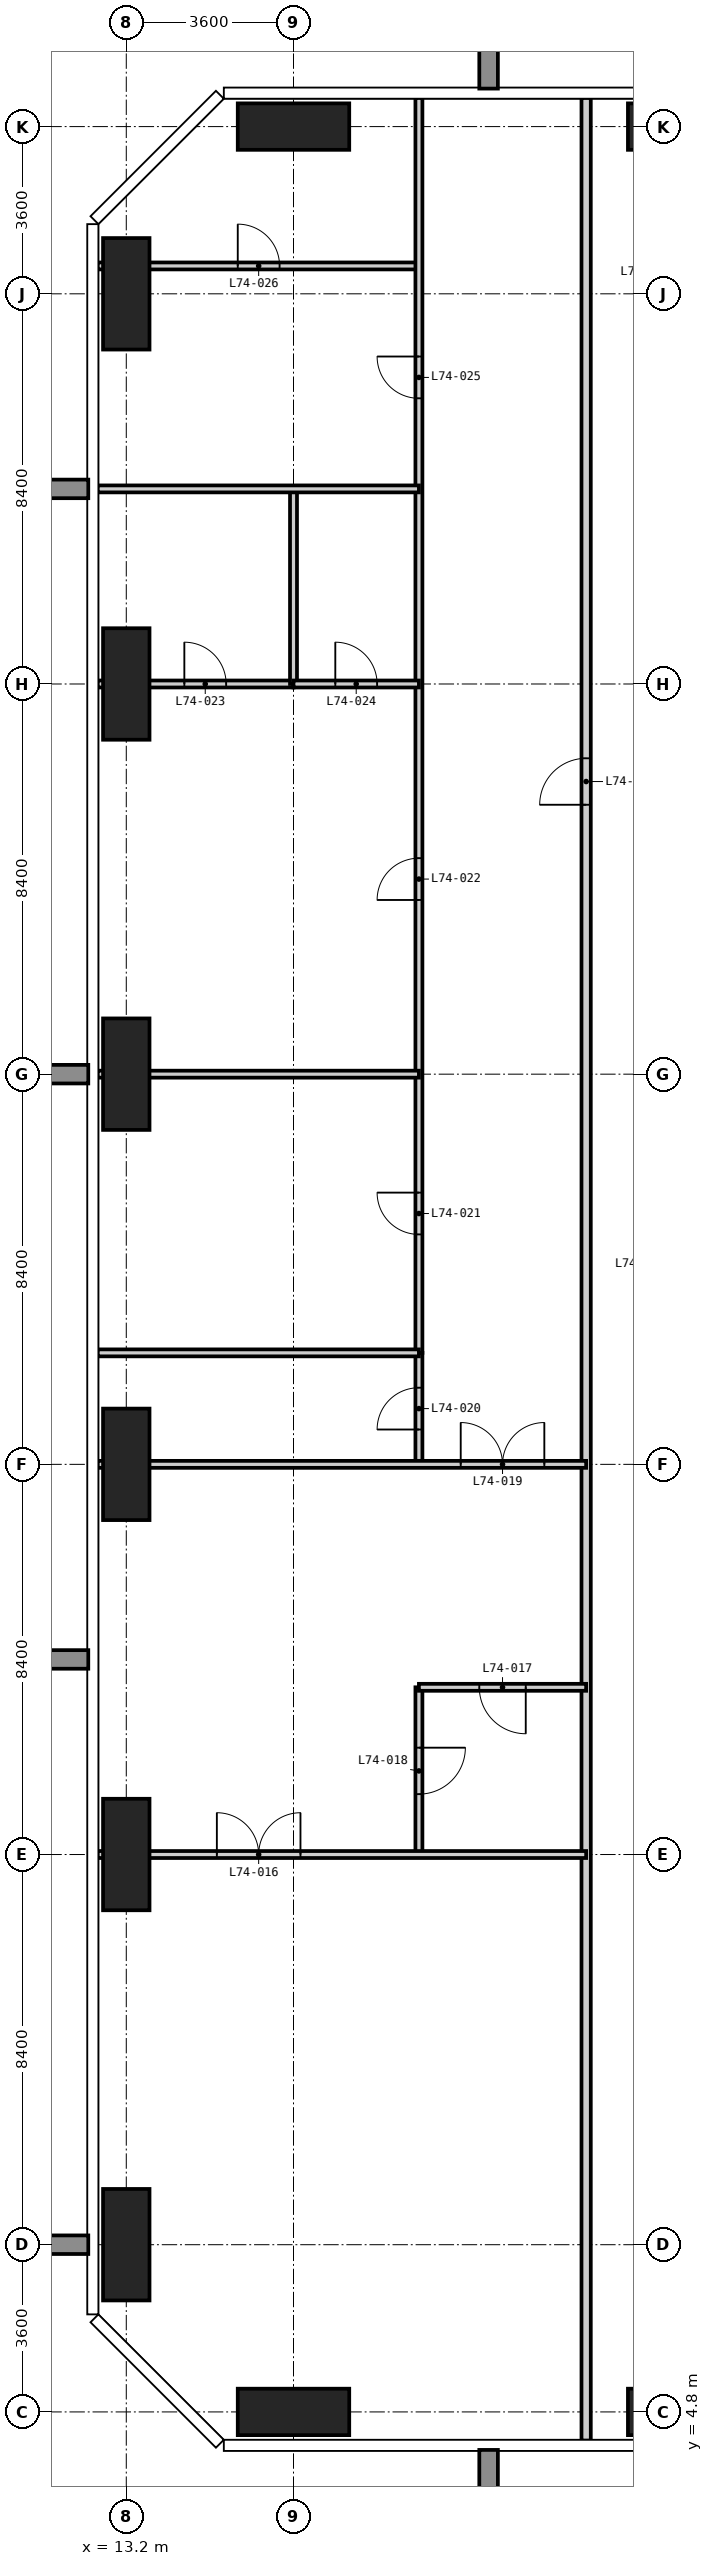
"""IFC4 building model, lengths in metres.
Left out: names, types, materials, properties, quantities, classifications, styles, units other than length and angle.
Written with IfcOpenShell. Run it as: python <this file> out.ifc"""

import sys

from ifc_helpers import new_model, si_unit, direction, frame, frame_2d, origin, origin_2d, place, context, subcontext, project, spatial, rectangle, extrude, element, fill, save


model = new_model("IFC4")
c1 = context("Model", 3, precision=1e-05, world=origin(), true_north=direction((0.0, 1.0)))
c2 = subcontext(c1, "Body", "Model", "MODEL_VIEW")
j1 = project(units=[si_unit("LENGTHUNIT", "METRE"), si_unit("PLANEANGLEUNIT", "RADIAN")], contexts=[c1])
p1 = place(None, origin())
s1 = spatial("IfcSite", under=j1, at=p1, CompositionType="ELEMENT")
p2 = place(p1, origin())
s2 = spatial("IfcBuilding", under=s1, at=p2, CompositionType="ELEMENT")
p3 = place(p2, frame((0.0, 0.0, 289.1)))
s3 = spatial("IfcBuildingStorey", under=s2, at=p3, CompositionType="ELEMENT", Elevation=289.1)
for number, where, z_axis, x_axis in (
    (1, (13.2, 8.4, -0.35), (0.0, 0.0, 1.0), (1.0, 0.0, 0.0)),
    (2, (13.2, 16.8, -0.35), (0.0, 0.0, 1.0), (1.0, 0.0, 0.0)),
    (3, (13.2, 25.2, -0.35), (0.0, 0.0, 1.0), (1.0, 0.0, 0.0)),
    (4, (13.2, 33.6, -0.35), (0.0, 0.0, 1.0), (1.0, 0.0, 0.0)),
    (5, (13.2, 42.0, -0.35), (0.0, 0.0, 1.0), (1.0, 0.0, 0.0)),
    (6, (13.2, 50.4, -0.35), (0.0, 0.0, 1.0), (1.0, 0.0, 0.0)),
):
    element("IfcColumn", number, at=place(p3, frame(where, z_axis=z_axis, x_axis=x_axis)), inside=s3, PredefinedType="COLUMN", context=c2, shape_type="SweptSolid", body=[
        extrude(rectangle(XDim=1.0, YDim=2.4, at=origin_2d()), origin(), (0.0, 0.0, 1.0), 4.5),
    ])
for number, where, z_axis, x_axis in (
    (7, (16.8, 4.8, -0.35), (0.0, 0.0, 1.0), (1.0, 0.0, 0.0)),
    (8, (16.8, 54.0, -0.35), (0.0, 0.0, 1.0), (1.0, 0.0, 0.0)),
    (9, (25.2, 4.8, -0.35), (0.0, 0.0, 1.0), (1.0, 0.0, 0.0)),
    (10, (25.2, 54.0, -0.35), (0.0, 0.0, 1.0), (1.0, 0.0, 0.0)),
):
    element("IfcColumn", number, at=place(p3, frame(where, z_axis=z_axis, x_axis=x_axis)), inside=s3, PredefinedType="COLUMN", context=c2, shape_type="SweptSolid", body=[
        extrude(rectangle(XDim=2.4, YDim=1.0, at=origin_2d()), origin(), (0.0, 0.0, 1.0), 4.5),
    ])
p4 = place(p3, frame((19.5, 25.2, 0.0), z_axis=(0.0, 0.0, 1.0), x_axis=(0.0, 1.0, 0.0)))
e11 = element("IfcWall", 11, at=p4, inside=s3, PredefinedType="PARTITIONING", context=c2, shape_type="SweptSolid", body=[
    extrude(rectangle(XDim=2.4, YDim=0.15, at=frame_2d((1.2, 0.0))), origin(), (0.0, 0.0, 1.0), 4.15),
])
p5 = place(p4, frame((0.75, 0.0, 0.0)))
e12 = element("IfcOpeningElement", 12, at=p5, cuts=e11, PredefinedType="OPENING", context=c2, shape_type="SweptSolid", body=[
    extrude(rectangle(XDim=0.9, YDim=2.1, at=frame_2d((0.45, 1.05))), frame((0.0, 0.085, 0.0), z_axis=(0.0, -1.0, 0.0), x_axis=(1.0, 0.0, 0.0)), (0.0, 0.0, 1.0), 0.17),
])
p6 = place(p3, frame((12.582, 42.0, 0.0), z_axis=(0.0, 0.0, 1.0), x_axis=(1.0, 0.0, 0.0)))
e13 = element("IfcWall", 13, at=p6, inside=s3, PredefinedType="PARTITIONING", context=c2, shape_type="SweptSolid", body=[
    extrude(rectangle(XDim=4.218, YDim=0.15, at=frame_2d((2.109, 0.0))), origin(), (0.0, 0.0, 1.0), 4.15),
])
p7 = place(p6, frame((1.868, 0.0, 0.0)))
e14 = element("IfcOpeningElement", 14, at=p7, cuts=e13, PredefinedType="OPENING", context=c2, shape_type="SweptSolid", body=[
    extrude(rectangle(XDim=0.9, YDim=2.1, at=frame_2d((0.45, 1.05))), frame((0.0, 0.085, 0.0), z_axis=(0.0, -1.0, 0.0), x_axis=(1.0, 0.0, 0.0)), (0.0, 0.0, 1.0), 0.17),
])
p8 = place(p3, frame((12.582, 51.0, 0.0), z_axis=(0.0, 0.0, 1.0), x_axis=(1.0, 0.0, 0.0)))
e15 = element("IfcWall", 15, at=p8, inside=s3, PredefinedType="PARTITIONING", context=c2, shape_type="SweptSolid", body=[
    extrude(rectangle(XDim=6.918, YDim=0.15, at=frame_2d((3.459, 0.0))), origin(), (0.0, 0.0, 1.0), 4.15),
])
p9 = place(p8, frame((3.018, 0.0, 0.0)))
e16 = element("IfcOpeningElement", 16, at=p9, cuts=e15, PredefinedType="OPENING", context=c2, shape_type="SweptSolid", body=[
    extrude(rectangle(XDim=0.9, YDim=2.1, at=frame_2d((0.45, 1.05))), frame((0.0, 0.085, 0.0), z_axis=(0.0, -1.0, 0.0), x_axis=(1.0, 0.0, 0.0)), (0.0, 0.0, 1.0), 0.17),
])
p10 = place(p3, frame((23.1, 4.182, 0.0), z_axis=(0.0, 0.0, 1.0), x_axis=(0.0, 1.0, 0.0)))
e17 = element("IfcWall", 17, at=p10, inside=s3, PredefinedType="PARTITIONING", context=c2, shape_type="SweptSolid", body=[
    extrude(rectangle(XDim=50.436, YDim=0.2, at=frame_2d((25.218, 0.0))), origin(), (0.0, 0.0, 1.0), 4.15),
])
p11 = place(p10, frame((35.218, 0.0, 0.0)))
e18 = element("IfcOpeningElement", 18, at=p11, cuts=e17, PredefinedType="OPENING", context=c2, shape_type="SweptSolid", body=[
    extrude(rectangle(XDim=1.0, YDim=2.2, at=frame_2d((0.5, 1.1))), frame((0.0, 0.11, 0.0), z_axis=(0.0, -1.0, 0.0), x_axis=(1.0, 0.0, 0.0)), (0.0, 0.0, 1.0), 0.22),
])
p12 = place(p3, frame((16.8, 42.0, 0.0), z_axis=(0.0, 0.0, 1.0), x_axis=(0.0, 1.0, 0.0)))
e19 = element("IfcWall", 19, at=p12, inside=s3, PredefinedType="PARTITIONING", context=c2, shape_type="SweptSolid", body=[
    extrude(rectangle(XDim=4.2, YDim=0.15, at=frame_2d((2.1, 0.0))), origin(), (0.0, 0.0, 1.0), 4.15),
])
p13 = place(p3, frame((19.5, 16.8, 0.0), z_axis=(0.0, 0.0, 1.0), x_axis=(0.0, 1.0, 0.0)))
e20 = element("IfcWall", 20, at=p13, inside=s3, PredefinedType="PARTITIONING", context=c2, shape_type="SweptSolid", body=[
    extrude(rectangle(XDim=3.6, YDim=0.15, at=frame_2d((1.8, 0.0))), origin(), (0.0, 0.0, 1.0), 4.15),
])
p14 = place(p13, frame((1.3, 0.0, 0.0)))
e21 = element("IfcOpeningElement", 21, at=p14, cuts=e20, PredefinedType="OPENING", context=c2, shape_type="SweptSolid", body=[
    extrude(rectangle(XDim=1.0, YDim=2.1, at=frame_2d((0.5, 1.05))), frame((0.0, 0.085, 0.0), z_axis=(0.0, -1.0, 0.0), x_axis=(1.0, 0.0, 0.0)), (0.0, 0.0, 1.0), 0.17),
])
p15 = place(p3, frame((19.5, 27.6, 0.0), z_axis=(0.0, 0.0, 1.0), x_axis=(0.0, 1.0, 0.0)))
e22 = element("IfcWall", 22, at=p15, inside=s3, PredefinedType="PARTITIONING", context=c2, shape_type="SweptSolid", body=[
    extrude(rectangle(XDim=27.018, YDim=0.15, at=frame_2d((13.509, 0.0))), origin(), (0.0, 0.0, 1.0), 4.15),
])
p16 = place(p15, frame((2.55, 0.0, 0.0)))
e23 = element("IfcOpeningElement", 23, at=p16, cuts=e22, PredefinedType="OPENING", context=c2, shape_type="SweptSolid", body=[
    extrude(rectangle(XDim=0.9, YDim=2.1, at=frame_2d((0.45, 1.05))), frame((0.0, 0.085, 0.0), z_axis=(0.0, -1.0, 0.0), x_axis=(1.0, 0.0, 0.0)), (0.0, 0.0, 1.0), 0.17),
])
p17 = place(p15, frame((9.75, 0.0, 0.0)))
e24 = element("IfcOpeningElement", 24, at=p17, cuts=e22, PredefinedType="OPENING", context=c2, shape_type="SweptSolid", body=[
    extrude(rectangle(XDim=0.9, YDim=2.1, at=frame_2d((0.45, 1.05))), frame((0.0, 0.085, 0.0), z_axis=(0.0, -1.0, 0.0), x_axis=(1.0, 0.0, 0.0)), (0.0, 0.0, 1.0), 0.17),
])
p18 = place(p15, frame((20.55, 0.0, 0.0)))
e25 = element("IfcOpeningElement", 25, at=p18, cuts=e22, PredefinedType="OPENING", context=c2, shape_type="SweptSolid", body=[
    extrude(rectangle(XDim=0.9, YDim=2.1, at=frame_2d((0.45, 1.05))), frame((0.0, 0.085, 0.0), z_axis=(0.0, -1.0, 0.0), x_axis=(1.0, 0.0, 0.0)), (0.0, 0.0, 1.0), 0.17),
])
p19 = place(p3, frame((12.582, 16.8, 0.0), z_axis=(0.0, 0.0, 1.0), x_axis=(1.0, 0.0, 0.0)))
e26 = element("IfcWall", 26, at=p19, inside=s3, PredefinedType="PARTITIONING", context=c2, shape_type="SweptSolid", body=[
    extrude(rectangle(XDim=10.518, YDim=0.15, at=frame_2d((5.259, 0.0))), origin(), (0.0, 0.0, 1.0), 4.15),
])
p20 = place(p19, frame((2.568, 0.0, 0.0)))
e27 = element("IfcOpeningElement", 27, at=p20, cuts=e26, PredefinedType="OPENING", context=c2, shape_type="SweptSolid", body=[
    extrude(rectangle(XDim=1.8, YDim=2.4, at=frame_2d((0.9, 1.2))), frame((0.0, 0.085, 0.0), z_axis=(0.0, -1.0, 0.0), x_axis=(1.0, 0.0, 0.0)), (0.0, 0.0, 1.0), 0.17),
])
p21 = place(p3, frame((19.5, 20.4, 0.0), z_axis=(0.0, 0.0, 1.0), x_axis=(1.0, 0.0, 0.0)))
e28 = element("IfcWall", 28, at=p21, inside=s3, PredefinedType="PARTITIONING", context=c2, shape_type="SweptSolid", body=[
    extrude(rectangle(XDim=3.6, YDim=0.15, at=frame_2d((1.8, 0.0))), origin(), (0.0, 0.0, 1.0), 4.15),
])
p22 = place(p21, frame((1.3, 0.0, 0.0)))
e29 = element("IfcOpeningElement", 29, at=p22, cuts=e28, PredefinedType="OPENING", context=c2, shape_type="SweptSolid", body=[
    extrude(rectangle(XDim=1.0, YDim=2.1, at=frame_2d((0.5, 1.05))), frame((0.0, 0.085, 0.0), z_axis=(0.0, -1.0, 0.0), x_axis=(1.0, 0.0, 0.0)), (0.0, 0.0, 1.0), 0.17),
])
p23 = place(p3, frame((12.582, 25.2, 0.0), z_axis=(0.0, 0.0, 1.0), x_axis=(1.0, 0.0, 0.0)))
e30 = element("IfcWall", 30, at=p23, inside=s3, PredefinedType="PARTITIONING", context=c2, shape_type="SweptSolid", body=[
    extrude(rectangle(XDim=10.518, YDim=0.15, at=frame_2d((5.259, 0.0))), origin(), (0.0, 0.0, 1.0), 4.15),
])
p24 = place(p23, frame((7.818, 0.0, 0.0)))
e31 = element("IfcOpeningElement", 31, at=p24, cuts=e30, PredefinedType="OPENING", context=c2, shape_type="SweptSolid", body=[
    extrude(rectangle(XDim=1.8, YDim=2.4, at=frame_2d((0.9, 1.2))), frame((0.0, 0.085, 0.0), z_axis=(0.0, -1.0, 0.0), x_axis=(1.0, 0.0, 0.0)), (0.0, 0.0, 1.0), 0.17),
])
for number, where, z_axis, x_axis in (
    (32, (12.582, 27.6, 0.0), (0.0, 0.0, 1.0), (1.0, 0.0, 0.0)),
    (33, (12.582, 33.6, 0.0), (0.0, 0.0, 1.0), (1.0, 0.0, 0.0)),
):
    element("IfcWall", number, at=place(p3, frame(where, z_axis=z_axis, x_axis=x_axis)), inside=s3, PredefinedType="PARTITIONING", context=c2, shape_type="SweptSolid", body=[
        extrude(rectangle(XDim=6.918, YDim=0.15, at=frame_2d((3.459, 0.0))), origin(), (0.0, 0.0, 1.0), 4.15),
    ])
p25 = place(p3, frame((16.8, 42.0, 0.0), z_axis=(0.0, 0.0, 1.0), x_axis=(1.0, 0.0, 0.0)))
e34 = element("IfcWall", 34, at=p25, inside=s3, PredefinedType="PARTITIONING", context=c2, shape_type="SweptSolid", body=[
    extrude(rectangle(XDim=2.7, YDim=0.15, at=frame_2d((1.35, 0.0))), origin(), (0.0, 0.0, 1.0), 4.15),
])
p26 = place(p25, frame((0.9, 0.0, 0.0)))
e35 = element("IfcOpeningElement", 35, at=p26, cuts=e34, PredefinedType="OPENING", context=c2, shape_type="SweptSolid", body=[
    extrude(rectangle(XDim=0.9, YDim=2.1, at=frame_2d((0.45, 1.05))), frame((0.0, 0.085, 0.0), z_axis=(0.0, -1.0, 0.0), x_axis=(1.0, 0.0, 0.0)), (0.0, 0.0, 1.0), 0.17),
])
p27 = place(p3, frame((12.582, 46.2, 0.0), z_axis=(0.0, 0.0, 1.0), x_axis=(1.0, 0.0, 0.0)))
e36 = element("IfcWall", 36, at=p27, inside=s3, PredefinedType="PARTITIONING", context=c2, shape_type="SweptSolid", body=[
    extrude(rectangle(XDim=6.918, YDim=0.15, at=frame_2d((3.459, 0.0))), origin(), (0.0, 0.0, 1.0), 4.15),
])
p28 = place(p11, origin())
e37 = element("IfcDoor", 37, at=p28, inside=s3, OperationType="SINGLE_SWING_LEFT", PredefinedType="DOOR", context=c2, shape_type="SweptSolid", body=[
    extrude(rectangle(XDim=1.0, YDim=2.2, at=frame_2d((0.5, 1.1))), frame((0.0, 0.025, 0.0), z_axis=(0.0, -1.0, 0.0), x_axis=(1.0, 0.0, 0.0)), (0.0, 0.0, 1.0), 0.05),
])
fill(e18, e37)
p29 = place(p20, origin())
e38 = element("IfcDoor", 38, at=p29, inside=s3, OperationType="DOUBLE_DOOR_DOUBLE_SWING", PredefinedType="DOOR", context=c2, shape_type="SweptSolid", body=[
    extrude(rectangle(XDim=1.8, YDim=2.4, at=frame_2d((0.9, 1.2))), frame((0.0, 0.025, 0.0), z_axis=(0.0, -1.0, 0.0), x_axis=(1.0, 0.0, 0.0)), (0.0, 0.0, 1.0), 0.05),
])
fill(e27, e38)
p30 = place(p22, frame((1.0, 0.0, 0.0), z_axis=(0.0, 0.0, 1.0), x_axis=(-1.0, 0.0, 0.0)))
e39 = element("IfcDoor", 39, at=p30, inside=s3, OperationType="SINGLE_SWING_LEFT", PredefinedType="DOOR", context=c2, shape_type="SweptSolid", body=[
    extrude(rectangle(XDim=1.0, YDim=2.1, at=frame_2d((0.5, 1.05))), frame((0.0, 0.025, 0.0), z_axis=(0.0, -1.0, 0.0), x_axis=(1.0, 0.0, 0.0)), (0.0, 0.0, 1.0), 0.05),
])
fill(e29, e39)
p31 = place(p14, frame((1.0, 0.0, 0.0), z_axis=(0.0, 0.0, 1.0), x_axis=(-1.0, 0.0, 0.0)))
e40 = element("IfcDoor", 40, at=p31, inside=s3, OperationType="SINGLE_SWING_LEFT", PredefinedType="DOOR", context=c2, shape_type="SweptSolid", body=[
    extrude(rectangle(XDim=1.0, YDim=2.1, at=frame_2d((0.5, 1.05))), frame((0.0, 0.025, 0.0), z_axis=(0.0, -1.0, 0.0), x_axis=(1.0, 0.0, 0.0)), (0.0, 0.0, 1.0), 0.05),
])
fill(e21, e40)
p32 = place(p24, origin())
e41 = element("IfcDoor", 41, at=p32, inside=s3, OperationType="DOUBLE_DOOR_DOUBLE_SWING", PredefinedType="DOOR", context=c2, shape_type="SweptSolid", body=[
    extrude(rectangle(XDim=1.8, YDim=2.4, at=frame_2d((0.9, 1.2))), frame((0.0, 0.025, 0.0), z_axis=(0.0, -1.0, 0.0), x_axis=(1.0, 0.0, 0.0)), (0.0, 0.0, 1.0), 0.05),
])
fill(e31, e41)
p33 = place(p5, origin())
e42 = element("IfcDoor", 42, at=p33, inside=s3, OperationType="SINGLE_SWING_LEFT", PredefinedType="DOOR", context=c2, shape_type="SweptSolid", body=[
    extrude(rectangle(XDim=0.9, YDim=2.1, at=frame_2d((0.45, 1.05))), frame((0.0, 0.025, 0.0), z_axis=(0.0, -1.0, 0.0), x_axis=(1.0, 0.0, 0.0)), (0.0, 0.0, 1.0), 0.05),
])
fill(e12, e42)
p34 = place(p16, origin())
e43 = element("IfcDoor", 43, at=p34, inside=s3, OperationType="SINGLE_SWING_RIGHT", PredefinedType="DOOR", context=c2, shape_type="SweptSolid", body=[
    extrude(rectangle(XDim=0.9, YDim=2.1, at=frame_2d((0.45, 1.05))), frame((0.0, 0.025, 0.0), z_axis=(0.0, -1.0, 0.0), x_axis=(1.0, 0.0, 0.0)), (0.0, 0.0, 1.0), 0.05),
])
fill(e23, e43)
p35 = place(p17, origin())
e44 = element("IfcDoor", 44, at=p35, inside=s3, OperationType="SINGLE_SWING_LEFT", PredefinedType="DOOR", context=c2, shape_type="SweptSolid", body=[
    extrude(rectangle(XDim=0.9, YDim=2.1, at=frame_2d((0.45, 1.05))), frame((0.0, 0.025, 0.0), z_axis=(0.0, -1.0, 0.0), x_axis=(1.0, 0.0, 0.0)), (0.0, 0.0, 1.0), 0.05),
])
fill(e24, e44)
p36 = place(p7, origin())
e45 = element("IfcDoor", 45, at=p36, inside=s3, OperationType="SINGLE_SWING_LEFT", PredefinedType="DOOR", context=c2, shape_type="SweptSolid", body=[
    extrude(rectangle(XDim=0.9, YDim=2.1, at=frame_2d((0.45, 1.05))), frame((0.0, 0.025, 0.0), z_axis=(0.0, -1.0, 0.0), x_axis=(1.0, 0.0, 0.0)), (0.0, 0.0, 1.0), 0.05),
])
fill(e14, e45)
p37 = place(p26, origin())
e46 = element("IfcDoor", 46, at=p37, inside=s3, OperationType="SINGLE_SWING_LEFT", PredefinedType="DOOR", context=c2, shape_type="SweptSolid", body=[
    extrude(rectangle(XDim=0.9, YDim=2.1, at=frame_2d((0.45, 1.05))), frame((0.0, 0.025, 0.0), z_axis=(0.0, -1.0, 0.0), x_axis=(1.0, 0.0, 0.0)), (0.0, 0.0, 1.0), 0.05),
])
fill(e35, e46)
p38 = place(p18, origin())
e47 = element("IfcDoor", 47, at=p38, inside=s3, OperationType="SINGLE_SWING_RIGHT", PredefinedType="DOOR", context=c2, shape_type="SweptSolid", body=[
    extrude(rectangle(XDim=0.9, YDim=2.1, at=frame_2d((0.45, 1.05))), frame((0.0, 0.025, 0.0), z_axis=(0.0, -1.0, 0.0), x_axis=(1.0, 0.0, 0.0)), (0.0, 0.0, 1.0), 0.05),
])
fill(e25, e47)
p39 = place(p9, origin())
e48 = element("IfcDoor", 48, at=p39, inside=s3, OperationType="SINGLE_SWING_LEFT", PredefinedType="DOOR", context=c2, shape_type="SweptSolid", body=[
    extrude(rectangle(XDim=0.9, YDim=2.1, at=frame_2d((0.45, 1.05))), frame((0.0, 0.025, 0.0), z_axis=(0.0, -1.0, 0.0), x_axis=(1.0, 0.0, 0.0)), (0.0, 0.0, 1.0), 0.05),
])
fill(e16, e48)
save(model, sys.argv[1])
